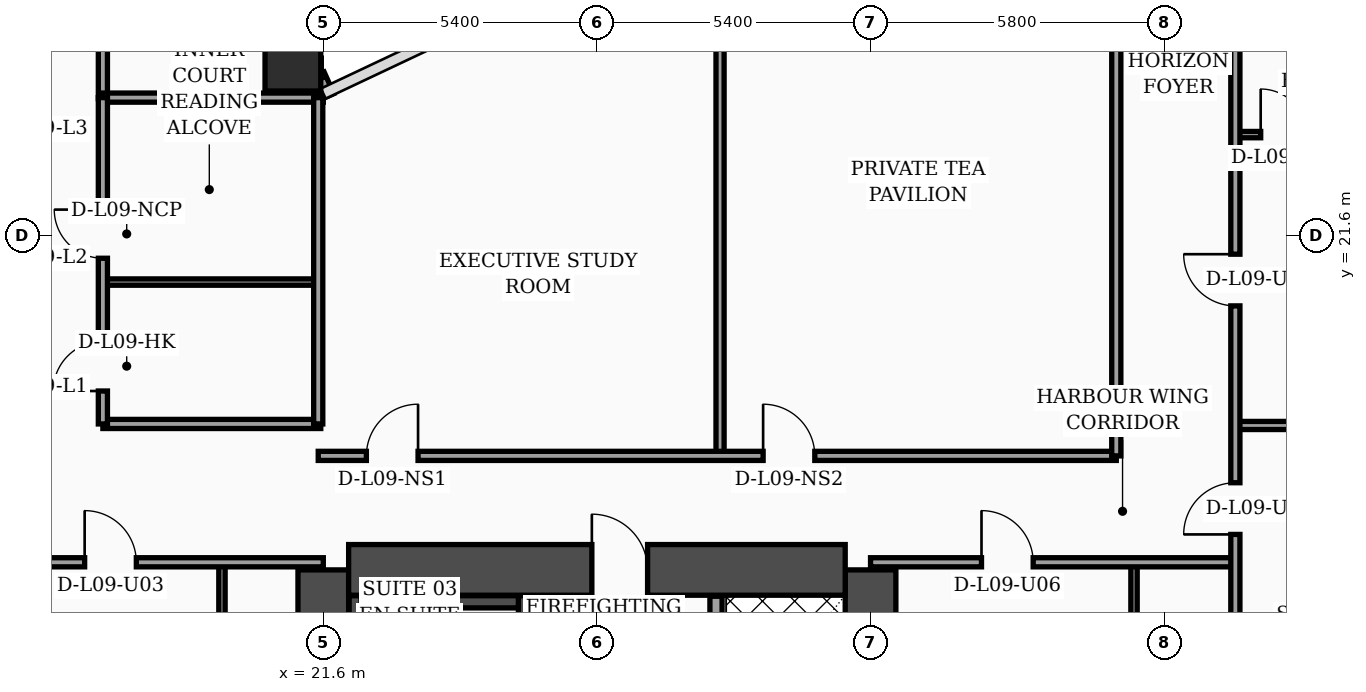
"""IFC4 building model, lengths in metres.
Left out: names, types, materials, properties, quantities, classifications, styles, units other than length and angle.
Written with IfcOpenShell. Run it as: python <this file> out.ifc"""

import sys

from ifc_helpers import new_model, si_unit, direction, frame, frame_2d, origin, origin_2d, place, context, subcontext, project, spatial, rectangle, hollow_rectangle, extrude, element, fill, save


model = new_model("IFC4")
c1 = context("Model", 3, precision=1e-05, world=origin(), true_north=direction((0.0, 1.0)))
c2 = subcontext(c1, "Body", "Model", "MODEL_VIEW")
j1 = project(units=[si_unit("LENGTHUNIT", "METRE"), si_unit("PLANEANGLEUNIT", "RADIAN")], contexts=[c1])
p1 = place(None, origin())
s1 = spatial("IfcSite", under=j1, at=p1, CompositionType="ELEMENT")
p2 = place(p1, origin())
s2 = spatial("IfcBuilding", under=s1, at=p2, CompositionType="ELEMENT")
p3 = place(p2, frame((0.0, 0.0, 42.2)))
s3 = spatial("IfcBuildingStorey", under=s2, at=p3, CompositionType="ELEMENT", Elevation=42.2)
for number, where, z_axis, x_axis in (
    (1, (21.6, 4.6, 0.0), (0.0, 0.0, 1.0), (0.0, 1.0, 0.0)),
    (2, (32.4, 4.6, 0.0), (0.0, 0.0, 1.0), (0.0, 1.0, 0.0)),
):
    element("IfcWall", number, at=place(p3, frame(where, z_axis=z_axis, x_axis=x_axis)), inside=s3, PredefinedType="SHEAR", context=c2, shape_type="SweptSolid", body=[
        extrude(rectangle(XDim=10.4, YDim=1.0, at=frame_2d((5.2, 0.0))), origin(), (0.0, 0.0, 1.0), 3.52),
    ])
p4 = place(p3, frame((22.1, 15.0, 0.0), z_axis=(0.0, 0.0, 1.0), x_axis=(1.0, 0.0, 0.0)))
e3 = element("IfcWall", 3, at=p4, inside=s3, PredefinedType="SHEAR", context=c2, shape_type="SweptSolid", body=[
    extrude(rectangle(XDim=9.8, YDim=1.0, at=frame_2d((4.9, 0.0))), origin(), (0.0, 0.0, 1.0), 3.52),
])
p5 = place(p4, frame((4.8, 0.0, 0.0)))
e4 = element("IfcOpeningElement", 4, at=p5, cuts=e3, PredefinedType="OPENING", context=c2, shape_type="SweptSolid", body=[
    extrude(rectangle(XDim=1.1, YDim=2.2, at=frame_2d((0.55, 1.1))), frame((0.0, 0.51, 0.0), z_axis=(0.0, -1.0, 0.0), x_axis=(1.0, 0.0, 0.0)), (0.0, 0.0, 1.0), 1.02),
])
p6 = place(p3, frame((22.23, 5.1, 0.0), z_axis=(0.0, 0.0, 1.0), x_axis=(0.0, 1.0, 0.0)))
e5 = element("IfcWall", 5, at=p6, inside=s3, PredefinedType="SOLIDWALL", context=c2, shape_type="SweptSolid", body=[
    extrude(rectangle(XDim=9.39, YDim=0.24, at=frame_2d((4.695, 0.0))), origin(), (0.0, 0.0, 1.0), 3.52),
])
p7 = place(p3, frame((25.57, 5.1, 0.0), z_axis=(0.0, 0.0, 1.0), x_axis=(0.0, 1.0, 0.0)))
e6 = element("IfcWall", 6, at=p7, inside=s3, PredefinedType="SOLIDWALL", context=c2, shape_type="SweptSolid", body=[
    extrude(rectangle(XDim=9.39, YDim=0.24, at=frame_2d((4.695, 0.0))), origin(), (0.0, 0.0, 1.0), 3.52),
])
p8 = place(p7, frame((0.35, 0.0, 0.0)))
e7 = element("IfcOpeningElement", 7, at=p8, cuts=e6, PredefinedType="OPENING", context=c2, shape_type="SweptSolid", body=[
    extrude(rectangle(XDim=1.15, YDim=2.2, at=frame_2d((0.575, 1.1))), frame((0.0, 0.13, 0.0), z_axis=(0.0, -1.0, 0.0), x_axis=(1.0, 0.0, 0.0)), (0.0, 0.0, 1.0), 0.26),
])
p9 = place(p3, frame((22.35, 14.37, 0.0), z_axis=(0.0, 0.0, 1.0), x_axis=(1.0, 0.0, 0.0)))
e8 = element("IfcWall", 8, at=p9, inside=s3, PredefinedType="SOLIDWALL", context=c2, shape_type="SweptSolid", body=[
    extrude(rectangle(XDim=3.1, YDim=0.24, at=frame_2d((1.55, 0.0))), origin(), (0.0, 0.0, 1.0), 3.52),
])
p10 = place(p3, frame((21.0, 25.0, 0.0), z_axis=(0.0, 0.0, 1.0), x_axis=(1.0, 0.0, 0.0)))
e9 = element("IfcColumn", 9, at=p10, inside=s3, PredefinedType="COLUMN", context=c2, shape_type="SweptSolid", body=[
    extrude(hollow_rectangle(XDim=1.1, YDim=1.1, WallThickness=0.045, at=origin_2d()), origin(), (0.0, 0.0, 1.0), 3.52),
])
p11 = place(p3, frame((21.68, 24.34, 0.0), z_axis=(0.0, 0.0, 1.0), x_axis=(-0.40758134973, 0.913168901875, 0.0)))
e10 = element("IfcWall", 10, at=p11, inside=s3, PredefinedType="SOLIDWALL", context=c2, shape_type="SweptSolid", body=[
    extrude(rectangle(XDim=0.471, YDim=0.28, at=frame_2d((0.235, 0.0))), origin(), (0.0, 0.0, 1.0), 3.52),
])
p12 = place(p3, frame((29.35, 5.12, 0.0), z_axis=(0.0, 0.0, 1.0), x_axis=(0.0, 1.0, 0.0)))
e11 = element("IfcWall", 11, at=p12, inside=s3, PredefinedType="SOLIDWALL", context=c2, shape_type="SweptSolid", body=[
    extrude(rectangle(XDim=9.36, YDim=0.24, at=frame_2d((4.68, 0.0))), origin(), (0.0, 0.0, 1.0), 3.52),
])
p13 = place(p12, frame((0.55, 0.0, 0.0)))
e12 = element("IfcOpeningElement", 12, at=p13, cuts=e11, PredefinedType="OPENING", context=c2, shape_type="SweptSolid", body=[
    extrude(rectangle(XDim=1.3, YDim=2.35, at=frame_2d((0.65, 1.175))), frame((0.0, 0.13, 0.0), z_axis=(0.0, -1.0, 0.0), x_axis=(1.0, 0.0, 0.0)), (0.0, 0.0, 1.0), 0.26),
])
p14 = place(p3, frame((19.6, 2.44, 0.0), z_axis=(0.0, 0.0, 1.0), x_axis=(0.0, 1.0, 0.0)))
e13 = element("IfcWall", 13, at=p14, inside=s3, PredefinedType="PARTITIONING", context=c2, shape_type="SweptSolid", body=[
    extrude(rectangle(XDim=12.71, YDim=0.125, at=frame_2d((6.355, 0.0))), origin(), (0.0, 0.0, 1.0), 2.32),
])
p15 = place(p14, frame((4.34, 0.0, 0.0)))
e14 = element("IfcOpeningElement", 14, at=p15, cuts=e13, PredefinedType="OPENING", context=c2, shape_type="SweptSolid", body=[
    extrude(rectangle(XDim=0.96, YDim=2.2, at=frame_2d((0.48, 1.1))), frame((0.0, 0.073, 0.0), z_axis=(0.0, -1.0, 0.0), x_axis=(1.0, 0.0, 0.0)), (0.0, 0.0, 1.0), 0.145),
])
p16 = place(p14, frame((10.18, 0.0, 0.0)))
e15 = element("IfcOpeningElement", 15, at=p16, cuts=e13, PredefinedType="OPENING", context=c2, shape_type="SweptSolid", body=[
    extrude(rectangle(XDim=0.9, YDim=2.15, at=frame_2d((0.45, 1.075))), frame((0.0, 0.073, 0.0), z_axis=(0.0, -1.0, 0.0), x_axis=(1.0, 0.0, 0.0)), (0.0, 0.0, 1.0), 0.145),
])
p17 = place(p3, frame((15.15, 15.15, 0.0), z_axis=(0.0, 0.0, 1.0), x_axis=(1.0, 0.0, 0.0)))
e16 = element("IfcWall", 16, at=p17, inside=s3, PredefinedType="PARTITIONING", context=c2, shape_type="SweptSolid", body=[
    extrude(rectangle(XDim=6.45, YDim=0.18, at=frame_2d((3.225, 0.0))), origin(), (0.0, 0.0, 1.0), 2.32),
])
p18 = place(p17, frame((1.74, 0.0, 0.0)))
e17 = element("IfcOpeningElement", 17, at=p18, cuts=e16, PredefinedType="OPENING", context=c2, shape_type="SweptSolid", body=[
    extrude(rectangle(XDim=1.02, YDim=2.2, at=frame_2d((0.51, 1.1))), frame((0.0, 0.1, 0.0), z_axis=(0.0, -1.0, 0.0), x_axis=(1.0, 0.0, 0.0)), (0.0, 0.0, 1.0), 0.2),
])
p19 = place(p3, frame((17.25, 24.3, 0.0), z_axis=(0.0, 0.0, 1.0), x_axis=(0.0, 1.0, 0.0)))
e18 = element("IfcWall", 18, at=p19, inside=s3, PredefinedType="PARTITIONING", context=c2, shape_type="SweptSolid", body=[
    extrude(rectangle(XDim=16.4, YDim=0.18, at=frame_2d((8.2, 0.0))), origin(), (0.0, 0.0, 1.0), 2.82),
])
p20 = place(p3, frame((17.25, 17.88, 0.0), z_axis=(0.0, 0.0, 1.0), x_axis=(1.0, 0.0, 0.0)))
e19 = element("IfcWall", 19, at=p20, inside=s3, PredefinedType="PARTITIONING", context=c2, shape_type="SweptSolid", body=[
    extrude(rectangle(XDim=4.3, YDim=0.18, at=frame_2d((2.15, 0.0))), origin(), (0.0, 0.0, 1.0), 3.52),
])
p21 = place(p3, frame((17.25, 20.68, 0.0), z_axis=(0.0, 0.0, 1.0), x_axis=(1.0, 0.0, 0.0)))
e20 = element("IfcWall", 20, at=p21, inside=s3, PredefinedType="PARTITIONING", context=c2, shape_type="SweptSolid", body=[
    extrude(rectangle(XDim=4.3, YDim=0.125, at=frame_2d((2.15, 0.0))), origin(), (0.0, 0.0, 1.0), 3.52),
])
p22 = place(p3, frame((17.25, 24.32, 0.0), z_axis=(0.0, 0.0, 1.0), x_axis=(1.0, 0.0, 0.0)))
e21 = element("IfcWall", 21, at=p22, inside=s3, PredefinedType="PARTITIONING", context=c2, shape_type="SweptSolid", body=[
    extrude(rectangle(XDim=4.35, YDim=0.18, at=frame_2d((2.175, 0.0))), origin(), (0.0, 0.0, 1.0), 3.52),
])
p23 = place(p3, frame((21.5, 17.88, 0.0), z_axis=(0.0, 0.0, 1.0), x_axis=(0.0, 1.0, 0.0)))
e22 = element("IfcWall", 22, at=p23, inside=s3, PredefinedType="PARTITIONING", context=c2, shape_type="SweptSolid", body=[
    extrude(rectangle(XDim=6.44, YDim=0.18, at=frame_2d((3.22, 0.0))), origin(), (0.0, 0.0, 1.0), 3.52),
])
p24 = place(p3, frame((17.25, 17.88, 0.0), z_axis=(0.0, 0.0, 1.0), x_axis=(0.0, 1.0, 0.0)))
e23 = element("IfcWall", 23, at=p24, inside=s3, PredefinedType="PARTITIONING", context=c2, shape_type="SweptSolid", body=[
    extrude(rectangle(XDim=6.44, YDim=0.18, at=frame_2d((3.22, 0.0))), origin(), (0.0, 0.0, 1.0), 3.52),
])
p25 = place(p24, frame((0.65, 0.0, 0.0)))
e24 = element("IfcOpeningElement", 24, at=p25, cuts=e23, PredefinedType="OPENING", context=c2, shape_type="SweptSolid", body=[
    extrude(rectangle(XDim=0.98, YDim=2.15, at=frame_2d((0.49, 1.075))), frame((0.0, 0.1, 0.0), z_axis=(0.0, -1.0, 0.0), x_axis=(1.0, 0.0, 0.0)), (0.0, 0.0, 1.0), 0.2),
])
p26 = place(p24, frame((3.27, 0.0, 0.0)))
e25 = element("IfcOpeningElement", 25, at=p26, cuts=e23, PredefinedType="OPENING", context=c2, shape_type="SweptSolid", body=[
    extrude(rectangle(XDim=0.96, YDim=2.2, at=frame_2d((0.48, 1.1))), frame((0.0, 0.1, 0.0), z_axis=(0.0, -1.0, 0.0), x_axis=(1.0, 0.0, 0.0)), (0.0, 0.0, 1.0), 0.2),
])
p27 = place(p3, frame((37.6, 2.44, 0.0), z_axis=(0.0, 0.0, 1.0), x_axis=(0.0, 1.0, 0.0)))
e26 = element("IfcWall", 26, at=p27, inside=s3, PredefinedType="PARTITIONING", context=c2, shape_type="SweptSolid", body=[
    extrude(rectangle(XDim=12.71, YDim=0.125, at=frame_2d((6.355, 0.0))), origin(), (0.0, 0.0, 1.0), 2.82),
])
p28 = place(p27, frame((4.35, 0.0, 0.0)))
e27 = element("IfcOpeningElement", 27, at=p28, cuts=e26, PredefinedType="OPENING", context=c2, shape_type="SweptSolid", body=[
    extrude(rectangle(XDim=0.96, YDim=2.2, at=frame_2d((0.48, 1.1))), frame((0.0, 0.073, 0.0), z_axis=(0.0, -1.0, 0.0), x_axis=(1.0, 0.0, 0.0)), (0.0, 0.0, 1.0), 0.145),
])
p29 = place(p27, frame((10.21, 0.0, 0.0)))
e28 = element("IfcOpeningElement", 28, at=p29, cuts=e26, PredefinedType="OPENING", context=c2, shape_type="SweptSolid", body=[
    extrude(rectangle(XDim=0.9, YDim=2.15, at=frame_2d((0.45, 1.075))), frame((0.0, 0.073, 0.0), z_axis=(0.0, -1.0, 0.0), x_axis=(1.0, 0.0, 0.0)), (0.0, 0.0, 1.0), 0.145),
])
p30 = place(p3, frame((32.4, 15.15, 0.0), z_axis=(0.0, 0.0, 1.0), x_axis=(1.0, 0.0, 0.0)))
e29 = element("IfcWall", 29, at=p30, inside=s3, PredefinedType="PARTITIONING", context=c2, shape_type="SweptSolid", body=[
    extrude(rectangle(XDim=7.2, YDim=0.18, at=frame_2d((3.6, 0.0))), origin(), (0.0, 0.0, 1.0), 2.82),
])
p31 = place(p30, frame((2.19, 0.0, 0.0)))
e30 = element("IfcOpeningElement", 30, at=p31, cuts=e29, PredefinedType="OPENING", context=c2, shape_type="SweptSolid", body=[
    extrude(rectangle(XDim=1.02, YDim=2.2, at=frame_2d((0.51, 1.1))), frame((0.0, 0.1, 0.0), z_axis=(0.0, -1.0, 0.0), x_axis=(1.0, 0.0, 0.0)), (0.0, 0.0, 1.0), 0.2),
])
p32 = place(p3, frame((29.43, 17.25, 0.0), z_axis=(0.0, 0.0, 1.0), x_axis=(0.0, 1.0, 0.0)))
e31 = element("IfcWall", 31, at=p32, inside=s3, PredefinedType="PARTITIONING", context=c2, shape_type="SweptSolid", body=[
    extrude(rectangle(XDim=10.93, YDim=0.16, at=frame_2d((5.465, 0.0))), origin(), (0.0, 0.0, 1.0), 2.82),
])
p33 = place(p3, frame((21.5, 17.25, 0.0), z_axis=(0.0, 0.0, 1.0), x_axis=(1.0, 0.0, 0.0)))
e32 = element("IfcWall", 32, at=p33, inside=s3, PredefinedType="PARTITIONING", context=c2, shape_type="SweptSolid", body=[
    extrude(rectangle(XDim=15.75, YDim=0.18, at=frame_2d((7.875, 0.0))), origin(), (0.0, 0.0, 1.0), 2.82),
])
p34 = place(p33, frame((0.95, 0.0, 0.0)))
e33 = element("IfcOpeningElement", 33, at=p34, cuts=e32, PredefinedType="OPENING", context=c2, shape_type="SweptSolid", body=[
    extrude(rectangle(XDim=1.02, YDim=2.2, at=frame_2d((0.51, 1.1))), frame((0.0, 0.1, 0.0), z_axis=(0.0, -1.0, 0.0), x_axis=(1.0, 0.0, 0.0)), (0.0, 0.0, 1.0), 0.2),
])
p35 = place(p33, frame((8.78, 0.0, 0.0)))
e34 = element("IfcOpeningElement", 34, at=p35, cuts=e32, PredefinedType="OPENING", context=c2, shape_type="SweptSolid", body=[
    extrude(rectangle(XDim=1.02, YDim=2.2, at=frame_2d((0.51, 1.1))), frame((0.0, 0.1, 0.0), z_axis=(0.0, -1.0, 0.0), x_axis=(1.0, 0.0, 0.0)), (0.0, 0.0, 1.0), 0.2),
])
p36 = place(p3, frame((37.25, 17.25, 0.0), z_axis=(0.0, 0.0, 1.0), x_axis=(0.0, 1.0, 0.0)))
e35 = element("IfcWall", 35, at=p36, inside=s3, PredefinedType="PARTITIONING", context=c2, shape_type="SweptSolid", body=[
    extrude(rectangle(XDim=14.62, YDim=0.18, at=frame_2d((7.31, 0.0))), origin(), (0.0, 0.0, 1.0), 2.82),
])
p37 = place(p3, frame((39.6, 23.59, 0.0), z_axis=(0.0, 0.0, 1.0), x_axis=(1.0, 0.0, 0.0)))
e36 = element("IfcWall", 36, at=p37, inside=s3, PredefinedType="PARTITIONING", context=c2, shape_type="SweptSolid", body=[
    extrude(rectangle(XDim=18.27, YDim=0.125, at=frame_2d((9.135, 0.0))), origin(), (0.0, 0.0, 1.0), 2.82),
])
p38 = place(p37, frame((0.5, 0.0, 0.0)))
e37 = element("IfcOpeningElement", 37, at=p38, cuts=e36, PredefinedType="OPENING", context=c2, shape_type="SweptSolid", body=[
    extrude(rectangle(XDim=0.9, YDim=2.15, at=frame_2d((0.45, 1.075))), frame((0.0, 0.073, 0.0), z_axis=(0.0, -1.0, 0.0), x_axis=(1.0, 0.0, 0.0)), (0.0, 0.0, 1.0), 0.145),
])
p39 = place(p37, frame((3.6, 0.0, 0.0)))
e38 = element("IfcOpeningElement", 38, at=p39, cuts=e36, PredefinedType="OPENING", context=c2, shape_type="SweptSolid", body=[
    extrude(rectangle(XDim=0.96, YDim=2.2, at=frame_2d((0.48, 1.1))), frame((0.0, 0.073, 0.0), z_axis=(0.0, -1.0, 0.0), x_axis=(1.0, 0.0, 0.0)), (0.0, 0.0, 1.0), 0.145),
])
p40 = place(p3, frame((39.6, 17.85, 0.0), z_axis=(0.0, 0.0, 1.0), x_axis=(1.0, 0.0, 0.0)))
e39 = element("IfcWall", 39, at=p40, inside=s3, PredefinedType="PARTITIONING", context=c2, shape_type="SweptSolid", body=[
    extrude(rectangle(XDim=20.08, YDim=0.16, at=frame_2d((10.04, 0.0))), origin(), (0.0, 0.0, 1.0), 2.82),
])
p41 = place(p3, frame((39.6, 2.44, 0.0), z_axis=(0.0, 0.0, 1.0), x_axis=(0.0, 1.0, 0.0)))
e40 = element("IfcWall", 40, at=p41, inside=s3, PredefinedType="PARTITIONING", context=c2, shape_type="SweptSolid", body=[
    extrude(rectangle(XDim=31.04, YDim=0.18, at=frame_2d((15.52, 0.0))), origin(), (0.0, 0.0, 1.0), 2.82),
])
p42 = place(p41, frame((13.26, 0.0, 0.0)))
e41 = element("IfcOpeningElement", 41, at=p42, cuts=e40, PredefinedType="OPENING", context=c2, shape_type="SweptSolid", body=[
    extrude(rectangle(XDim=1.02, YDim=2.2, at=frame_2d((0.51, 1.1))), frame((0.0, 0.1, 0.0), z_axis=(0.0, -1.0, 0.0), x_axis=(1.0, 0.0, 0.0)), (0.0, 0.0, 1.0), 0.2),
])
p43 = place(p41, frame((17.77, 0.0, 0.0)))
e42 = element("IfcOpeningElement", 42, at=p43, cuts=e40, PredefinedType="OPENING", context=c2, shape_type="SweptSolid", body=[
    extrude(rectangle(XDim=1.02, YDim=2.2, at=frame_2d((0.51, 1.1))), frame((0.0, 0.1, 0.0), z_axis=(0.0, -1.0, 0.0), x_axis=(1.0, 0.0, 0.0)), (0.0, 0.0, 1.0), 0.2),
])
p44 = place(p41, frame((25.58, 0.0, 0.0)))
e43 = element("IfcOpeningElement", 43, at=p44, cuts=e40, PredefinedType="OPENING", context=c2, shape_type="SweptSolid", body=[
    extrude(rectangle(XDim=1.02, YDim=2.2, at=frame_2d((0.51, 1.1))), frame((0.0, 0.1, 0.0), z_axis=(0.0, -1.0, 0.0), x_axis=(1.0, 0.0, 0.0)), (0.0, 0.0, 1.0), 0.2),
])
p45 = place(p18, origin())
e44 = element("IfcDoor", 44, at=p45, inside=s3, OperationType="SINGLE_SWING_LEFT", PredefinedType="DOOR", context=c2, shape_type="SweptSolid", body=[
    extrude(rectangle(XDim=1.02, YDim=2.2, at=frame_2d((0.51, 1.1))), frame((0.0, 0.025, 0.0), z_axis=(0.0, -1.0, 0.0), x_axis=(1.0, 0.0, 0.0)), (0.0, 0.0, 1.0), 0.05),
])
fill(e17, e44)
p46 = place(p25, origin())
e45 = element("IfcDoor", 45, at=p46, inside=s3, OperationType="SINGLE_SWING_LEFT", PredefinedType="DOOR", context=c2, shape_type="SweptSolid", body=[
    extrude(rectangle(XDim=0.98, YDim=2.15, at=frame_2d((0.49, 1.075))), frame((0.0, 0.025, 0.0), z_axis=(0.0, -1.0, 0.0), x_axis=(1.0, 0.0, 0.0)), (0.0, 0.0, 1.0), 0.05),
])
fill(e24, e45)
p47 = place(p26, origin())
e46 = element("IfcDoor", 46, at=p47, inside=s3, OperationType="SINGLE_SWING_RIGHT", PredefinedType="DOOR", context=c2, shape_type="SweptSolid", body=[
    extrude(rectangle(XDim=0.96, YDim=2.2, at=frame_2d((0.48, 1.1))), frame((0.0, 0.025, 0.0), z_axis=(0.0, -1.0, 0.0), x_axis=(1.0, 0.0, 0.0)), (0.0, 0.0, 1.0), 0.05),
])
fill(e25, e46)
p48 = place(p31, origin())
e47 = element("IfcDoor", 47, at=p48, inside=s3, OperationType="SINGLE_SWING_LEFT", PredefinedType="DOOR", context=c2, shape_type="SweptSolid", body=[
    extrude(rectangle(XDim=1.02, YDim=2.2, at=frame_2d((0.51, 1.1))), frame((0.0, 0.025, 0.0), z_axis=(0.0, -1.0, 0.0), x_axis=(1.0, 0.0, 0.0)), (0.0, 0.0, 1.0), 0.05),
])
fill(e30, e47)
p49 = place(p34, origin())
e48 = element("IfcDoor", 48, at=p49, inside=s3, OperationType="SINGLE_SWING_RIGHT", PredefinedType="DOOR", context=c2, shape_type="SweptSolid", body=[
    extrude(rectangle(XDim=1.02, YDim=2.2, at=frame_2d((0.51, 1.1))), frame((0.0, 0.025, 0.0), z_axis=(0.0, -1.0, 0.0), x_axis=(1.0, 0.0, 0.0)), (0.0, 0.0, 1.0), 0.05),
])
fill(e33, e48)
p50 = place(p35, origin())
e49 = element("IfcDoor", 49, at=p50, inside=s3, OperationType="SINGLE_SWING_LEFT", PredefinedType="DOOR", context=c2, shape_type="SweptSolid", body=[
    extrude(rectangle(XDim=1.02, YDim=2.2, at=frame_2d((0.51, 1.1))), frame((0.0, 0.025, 0.0), z_axis=(0.0, -1.0, 0.0), x_axis=(1.0, 0.0, 0.0)), (0.0, 0.0, 1.0), 0.05),
])
fill(e34, e49)
p51 = place(p38, origin())
e50 = element("IfcDoor", 50, at=p51, inside=s3, OperationType="SINGLE_SWING_LEFT", PredefinedType="DOOR", context=c2, shape_type="SweptSolid", body=[
    extrude(rectangle(XDim=0.9, YDim=2.15, at=frame_2d((0.45, 1.075))), frame((0.0, 0.025, 0.0), z_axis=(0.0, -1.0, 0.0), x_axis=(1.0, 0.0, 0.0)), (0.0, 0.0, 1.0), 0.05),
])
fill(e37, e50)
p52 = place(p42, origin())
e51 = element("IfcDoor", 51, at=p52, inside=s3, OperationType="SINGLE_SWING_LEFT", PredefinedType="DOOR", context=c2, shape_type="SweptSolid", body=[
    extrude(rectangle(XDim=1.02, YDim=2.2, at=frame_2d((0.51, 1.1))), frame((0.0, 0.025, 0.0), z_axis=(0.0, -1.0, 0.0), x_axis=(1.0, 0.0, 0.0)), (0.0, 0.0, 1.0), 0.05),
])
fill(e41, e51)
p53 = place(p43, origin())
e52 = element("IfcDoor", 52, at=p53, inside=s3, OperationType="SINGLE_SWING_RIGHT", PredefinedType="DOOR", context=c2, shape_type="SweptSolid", body=[
    extrude(rectangle(XDim=1.02, YDim=2.2, at=frame_2d((0.51, 1.1))), frame((0.0, 0.025, 0.0), z_axis=(0.0, -1.0, 0.0), x_axis=(1.0, 0.0, 0.0)), (0.0, 0.0, 1.0), 0.05),
])
fill(e42, e52)
p54 = place(p5, origin())
e53 = element("IfcDoor", 53, at=p54, inside=s3, OperationType="SINGLE_SWING_LEFT", PredefinedType="DOOR", context=c2, shape_type="SweptSolid", body=[
    extrude(rectangle(XDim=1.1, YDim=2.2, at=frame_2d((0.55, 1.1))), frame((0.0, 0.025, 0.0), z_axis=(0.0, -1.0, 0.0), x_axis=(1.0, 0.0, 0.0)), (0.0, 0.0, 1.0), 0.05),
])
fill(e4, e53)
save(model, sys.argv[1])
